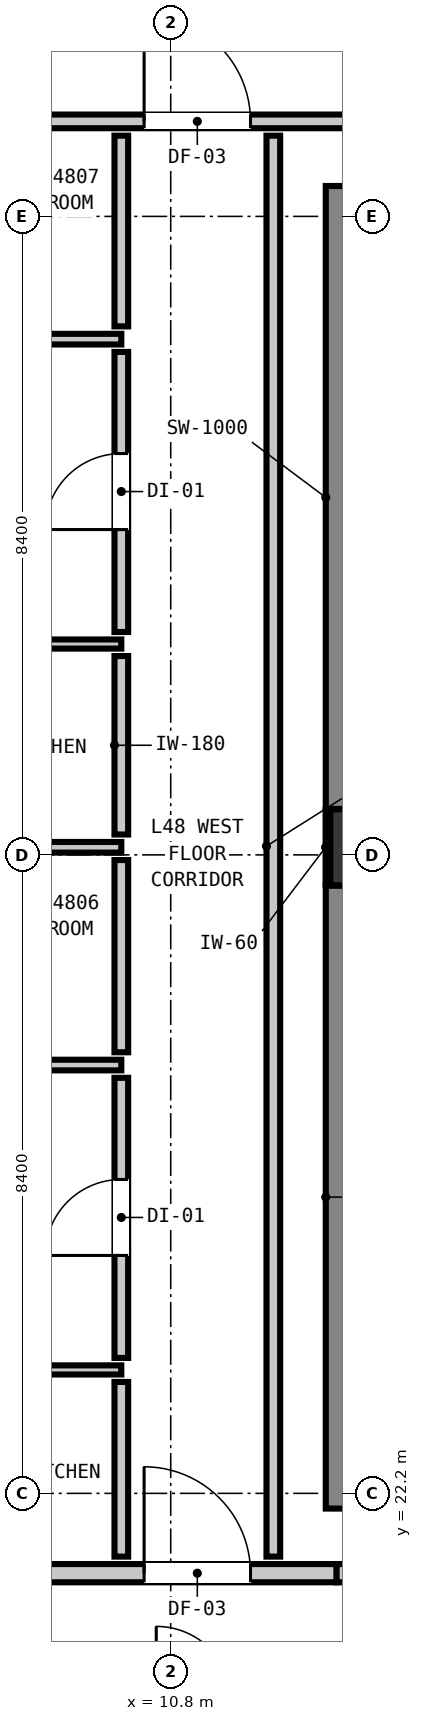
"""IFC4 building model, lengths in metres.
Left out: names, types, materials, properties, quantities, classifications, styles, units other than length and angle.
Written with IfcOpenShell. Run it as: python <this file> out.ifc"""

import sys

from ifc_helpers import new_model, si_unit, direction, frame, frame_2d, origin, origin_2d, place, context, subcontext, project, spatial, rectangle, extrude, element, fill, save


model = new_model("IFC4")
c1 = context("Model", 3, precision=1e-05, world=origin(), true_north=direction((0.0, 1.0)))
c2 = subcontext(c1, "Body", "Model", "MODEL_VIEW")
j1 = project(units=[si_unit("LENGTHUNIT", "METRE"), si_unit("PLANEANGLEUNIT", "RADIAN")], contexts=[c1])
p1 = place(None, origin())
s1 = spatial("IfcSite", under=j1, at=p1, CompositionType="ELEMENT")
p2 = place(p1, origin())
s2 = spatial("IfcBuilding", under=s1, at=p2, CompositionType="ELEMENT")
p3 = place(p2, frame((0.0, 0.0, 165.84)))
s3 = spatial("IfcBuildingStorey", under=s2, at=p3, CompositionType="ELEMENT", Elevation=165.84)
p4 = place(p3, frame((13.4, 30.7, 0.0), z_axis=(0.0, 0.0, 1.0), x_axis=(1.0, 0.0, 0.0)))
e1 = element("IfcColumn", 1, at=p4, inside=s3, PredefinedType="COLUMN", context=c2, shape_type="SweptSolid", body=[
    extrude(rectangle(XDim=1.0, YDim=1.0, at=origin_2d()), origin(), (0.0, 0.0, 1.0), 3.32),
])
p5 = place(p3, frame((13.34, 22.0, 0.0), z_axis=(0.0, 0.0, 1.0), x_axis=(0.0, 1.0, 0.0)))
e2 = element("IfcWall", 2, at=p5, inside=s3, PredefinedType="SHEAR", context=c2, shape_type="SweptSolid", body=[
    extrude(rectangle(XDim=8.195, YDim=1.0, at=frame_2d((4.098, 0.0))), origin(), (0.0, 0.0, 1.0), 3.32),
])
p6 = place(p3, frame((13.34, 31.205, 0.0), z_axis=(0.0, 0.0, 1.0), x_axis=(0.0, 1.0, 0.0)))
e3 = element("IfcWall", 3, at=p6, inside=s3, PredefinedType="SHEAR", context=c2, shape_type="SweptSolid", body=[
    extrude(rectangle(XDim=8.195, YDim=1.0, at=frame_2d((4.097, 0.0))), origin(), (0.0, 0.0, 1.0), 3.32),
])
p7 = place(p3, frame((4.067, 21.15, 0.0), z_axis=(0.0, 0.0, 1.0), x_axis=(1.0, 0.0, 0.0)))
e4 = element("IfcWall", 4, at=p7, inside=s3, PredefinedType="PARTITIONING", context=c2, shape_type="SweptSolid", body=[
    extrude(rectangle(XDim=8.916, YDim=0.24, at=frame_2d((4.458, 0.0))), origin(), (0.0, 0.0, 1.0), 2.565),
])
p8 = place(p7, frame((6.383, 0.0, 0.0)))
e5 = element("IfcOpeningElement", 5, at=p8, cuts=e4, PredefinedType="OPENING", context=c2, shape_type="SweptSolid", body=[
    extrude(rectangle(XDim=1.4, YDim=2.15, at=frame_2d((0.7, 1.075))), frame((0.0, 0.13, 0.0), z_axis=(0.0, -1.0, 0.0), x_axis=(1.0, 0.0, 0.0)), (0.0, 0.0, 1.0), 0.26),
])
p9 = place(p3, frame((12.983, 21.15, 0.0), z_axis=(0.0, 0.0, 1.0), x_axis=(1.0, 0.0, 0.0)))
e6 = element("IfcWall", 6, at=p9, inside=s3, PredefinedType="PARTITIONING", context=c2, shape_type="SweptSolid", body=[
    extrude(rectangle(XDim=29.61, YDim=0.24, at=frame_2d((14.805, 0.0))), origin(), (0.0, 0.0, 1.0), 3.08),
])
p10 = place(p9, frame((5.227, 0.0, 0.0)))
e7 = element("IfcOpeningElement", 7, at=p10, cuts=e6, PredefinedType="OPENING", context=c2, shape_type="SweptSolid", body=[
    extrude(rectangle(XDim=1.1, YDim=2.15, at=frame_2d((0.55, 1.075))), frame((0.0, 0.13, 0.0), z_axis=(0.0, -1.0, 0.0), x_axis=(1.0, 0.0, 0.0)), (0.0, 0.0, 1.0), 0.26),
])
p11 = place(p9, frame((25.067, 0.0, 0.0)))
e8 = element("IfcOpeningElement", 8, at=p11, cuts=e6, PredefinedType="OPENING", context=c2, shape_type="SweptSolid", body=[
    extrude(rectangle(XDim=1.4, YDim=2.15, at=frame_2d((0.7, 1.075))), frame((0.0, 0.13, 0.0), z_axis=(0.0, -1.0, 0.0), x_axis=(1.0, 0.0, 0.0)), (0.0, 0.0, 1.0), 0.26),
])
p12 = place(p3, frame((3.207, 40.25, 0.0), z_axis=(0.0, 0.0, 1.0), x_axis=(1.0, 0.0, 0.0)))
e9 = element("IfcWall", 9, at=p12, inside=s3, PredefinedType="PARTITIONING", context=c2, shape_type="SweptSolid", body=[
    extrude(rectangle(XDim=39.386, YDim=0.18, at=frame_2d((19.693, 0.0))), origin(), (0.0, 0.0, 1.0), 3.08),
])
p13 = place(p12, frame((14.228, 0.0, 0.0)))
e10 = element("IfcOpeningElement", 10, at=p13, cuts=e9, PredefinedType="OPENING", context=c2, shape_type="SweptSolid", body=[
    extrude(rectangle(XDim=1.4, YDim=2.15, at=frame_2d((0.7, 1.075))), frame((0.0, 0.1, 0.0), z_axis=(0.0, -1.0, 0.0), x_axis=(1.0, 0.0, 0.0)), (0.0, 0.0, 1.0), 0.2),
])
p14 = place(p12, frame((7.243, 0.0, 0.0)))
e11 = element("IfcOpeningElement", 11, at=p14, cuts=e9, PredefinedType="OPENING", context=c2, shape_type="SweptSolid", body=[
    extrude(rectangle(XDim=1.4, YDim=2.15, at=frame_2d((0.7, 1.075))), frame((0.0, 0.1, 0.0), z_axis=(0.0, -1.0, 0.0), x_axis=(1.0, 0.0, 0.0)), (0.0, 0.0, 1.0), 0.2),
])
p15 = place(p12, frame((34.843, 0.0, 0.0)))
e12 = element("IfcOpeningElement", 12, at=p15, cuts=e9, PredefinedType="OPENING", context=c2, shape_type="SweptSolid", body=[
    extrude(rectangle(XDim=1.4, YDim=2.15, at=frame_2d((0.7, 1.075))), frame((0.0, 0.1, 0.0), z_axis=(0.0, -1.0, 0.0), x_axis=(1.0, 0.0, 0.0)), (0.0, 0.0, 1.0), 0.2),
])
p16 = place(p3, frame((3.207, 27.835, 0.0), z_axis=(0.0, 0.0, 1.0), x_axis=(1.0, 0.0, 0.0)))
e13 = element("IfcWall", 13, at=p16, inside=s3, PredefinedType="PARTITIONING", context=c2, shape_type="SweptSolid", body=[
    extrude(rectangle(XDim=6.943, YDim=0.14, at=frame_2d((3.471, 0.0))), origin(), (0.0, 0.0, 1.0), 3.08),
])
p17 = place(p16, frame((5.006, 0.0, 0.0)))
e14 = element("IfcOpeningElement", 14, at=p17, cuts=e13, PredefinedType="OPENING", context=c2, shape_type="SweptSolid", body=[
    extrude(rectangle(XDim=0.86, YDim=2.02, at=frame_2d((0.43, 1.01))), frame((0.0, 0.08, 0.0), z_axis=(0.0, -1.0, 0.0), x_axis=(1.0, 0.0, 0.0)), (0.0, 0.0, 1.0), 0.16),
])
p18 = place(p16, frame((1.537, 0.0, 0.0)))
e15 = element("IfcOpeningElement", 15, at=p18, cuts=e13, PredefinedType="OPENING", context=c2, shape_type="SweptSolid", body=[
    extrude(rectangle(XDim=0.9, YDim=2.1, at=frame_2d((0.45, 1.05))), frame((0.0, 0.08, 0.0), z_axis=(0.0, -1.0, 0.0), x_axis=(1.0, 0.0, 0.0)), (0.0, 0.0, 1.0), 0.16),
])
p19 = place(p3, frame((4.232, 30.7, 0.0), z_axis=(0.0, 0.0, 1.0), x_axis=(1.0, 0.0, 0.0)))
e16 = element("IfcWall", 16, at=p19, inside=s3, PredefinedType="PARTITIONING", context=c2, shape_type="SweptSolid", body=[
    extrude(rectangle(XDim=5.918, YDim=0.14, at=frame_2d((2.959, 0.0))), origin(), (0.0, 0.0, 1.0), 2.315),
])
p20 = place(p3, frame((3.207, 37.385, 0.0), z_axis=(0.0, 0.0, 1.0), x_axis=(1.0, 0.0, 0.0)))
e17 = element("IfcWall", 17, at=p20, inside=s3, PredefinedType="PARTITIONING", context=c2, shape_type="SweptSolid", body=[
    extrude(rectangle(XDim=6.943, YDim=0.14, at=frame_2d((3.471, 0.0))), origin(), (0.0, 0.0, 1.0), 3.08),
])
p21 = place(p20, frame((5.006, 0.0, 0.0)))
e18 = element("IfcOpeningElement", 18, at=p21, cuts=e17, PredefinedType="OPENING", context=c2, shape_type="SweptSolid", body=[
    extrude(rectangle(XDim=0.86, YDim=2.02, at=frame_2d((0.43, 1.01))), frame((0.0, 0.08, 0.0), z_axis=(0.0, -1.0, 0.0), x_axis=(1.0, 0.0, 0.0)), (0.0, 0.0, 1.0), 0.16),
])
p22 = place(p20, frame((1.537, 0.0, 0.0)))
e19 = element("IfcOpeningElement", 19, at=p22, cuts=e17, PredefinedType="OPENING", context=c2, shape_type="SweptSolid", body=[
    extrude(rectangle(XDim=0.9, YDim=2.1, at=frame_2d((0.45, 1.05))), frame((0.0, 0.08, 0.0), z_axis=(0.0, -1.0, 0.0), x_axis=(1.0, 0.0, 0.0)), (0.0, 0.0, 1.0), 0.16),
])
p23 = place(p3, frame((3.207, 23.824, 0.0), z_axis=(0.0, 0.0, 1.0), x_axis=(1.0, 0.0, 0.0)))
e20 = element("IfcWall", 20, at=p23, inside=s3, PredefinedType="PARTITIONING", context=c2, shape_type="SweptSolid", body=[
    extrude(rectangle(XDim=6.943, YDim=0.12, at=frame_2d((3.471, 0.0))), origin(), (0.0, 0.0, 1.0), 3.08),
])
p24 = place(p23, frame((3.018, 0.0, 0.0)))
e21 = element("IfcOpeningElement", 21, at=p24, cuts=e20, PredefinedType="OPENING", context=c2, shape_type="SweptSolid", body=[
    extrude(rectangle(XDim=0.9, YDim=2.1, at=frame_2d((0.45, 1.05))), frame((0.0, 0.07, 0.0), z_axis=(0.0, -1.0, 0.0), x_axis=(1.0, 0.0, 0.0)), (0.0, 0.0, 1.0), 0.14),
])
p25 = place(p3, frame((3.207, 33.374, 0.0), z_axis=(0.0, 0.0, 1.0), x_axis=(1.0, 0.0, 0.0)))
e22 = element("IfcWall", 22, at=p25, inside=s3, PredefinedType="PARTITIONING", context=c2, shape_type="SweptSolid", body=[
    extrude(rectangle(XDim=6.943, YDim=0.12, at=frame_2d((3.471, 0.0))), origin(), (0.0, 0.0, 1.0), 3.08),
])
p26 = place(p25, frame((3.018, 0.0, 0.0)))
e23 = element("IfcOpeningElement", 23, at=p26, cuts=e22, PredefinedType="OPENING", context=c2, shape_type="SweptSolid", body=[
    extrude(rectangle(XDim=0.9, YDim=2.1, at=frame_2d((0.45, 1.05))), frame((0.0, 0.07, 0.0), z_axis=(0.0, -1.0, 0.0), x_axis=(1.0, 0.0, 0.0)), (0.0, 0.0, 1.0), 0.14),
])
p27 = place(p3, frame((10.15, 21.368, 0.0), z_axis=(0.0, 0.0, 1.0), x_axis=(0.0, 1.0, 0.0)))
e24 = element("IfcWall", 24, at=p27, inside=s3, PredefinedType="PARTITIONING", context=c2, shape_type="SweptSolid", body=[
    extrude(rectangle(XDim=2.298, YDim=0.18, at=frame_2d((1.149, 0.0))), origin(), (0.0, 0.0, 1.0), 3.08),
])
p28 = place(p3, frame((10.15, 23.982, 0.0), z_axis=(0.0, 0.0, 1.0), x_axis=(0.0, 1.0, 0.0)))
e25 = element("IfcWall", 25, at=p28, inside=s3, PredefinedType="PARTITIONING", context=c2, shape_type="SweptSolid", body=[
    extrude(rectangle(XDim=3.685, YDim=0.18, at=frame_2d((1.843, 0.0))), origin(), (0.0, 0.0, 1.0), 3.08),
])
p29 = place(p28, frame((1.348, 0.0, 0.0)))
e26 = element("IfcOpeningElement", 26, at=p29, cuts=e25, PredefinedType="OPENING", context=c2, shape_type="SweptSolid", body=[
    extrude(rectangle(XDim=1.0, YDim=2.15, at=frame_2d((0.5, 1.075))), frame((0.0, 0.1, 0.0), z_axis=(0.0, -1.0, 0.0), x_axis=(1.0, 0.0, 0.0)), (0.0, 0.0, 1.0), 0.2),
])
p30 = place(p3, frame((10.15, 28.003, 0.0), z_axis=(0.0, 0.0, 1.0), x_axis=(0.0, 1.0, 0.0)))
e27 = element("IfcWall", 27, at=p30, inside=s3, PredefinedType="PARTITIONING", context=c2, shape_type="SweptSolid", body=[
    extrude(rectangle(XDim=2.529, YDim=0.18, at=frame_2d((1.265, 0.0))), origin(), (0.0, 0.0, 1.0), 3.08),
])
p31 = place(p3, frame((10.15, 30.868, 0.0), z_axis=(0.0, 0.0, 1.0), x_axis=(0.0, 1.0, 0.0)))
e28 = element("IfcWall", 28, at=p31, inside=s3, PredefinedType="PARTITIONING", context=c2, shape_type="SweptSolid", body=[
    extrude(rectangle(XDim=2.348, YDim=0.18, at=frame_2d((1.174, 0.0))), origin(), (0.0, 0.0, 1.0), 3.08),
])
p32 = place(p3, frame((10.15, 33.532, 0.0), z_axis=(0.0, 0.0, 1.0), x_axis=(0.0, 1.0, 0.0)))
e29 = element("IfcWall", 29, at=p32, inside=s3, PredefinedType="PARTITIONING", context=c2, shape_type="SweptSolid", body=[
    extrude(rectangle(XDim=3.685, YDim=0.18, at=frame_2d((1.843, 0.0))), origin(), (0.0, 0.0, 1.0), 3.08),
])
p33 = place(p32, frame((1.348, 0.0, 0.0)))
e30 = element("IfcOpeningElement", 30, at=p33, cuts=e29, PredefinedType="OPENING", context=c2, shape_type="SweptSolid", body=[
    extrude(rectangle(XDim=1.0, YDim=2.15, at=frame_2d((0.5, 1.075))), frame((0.0, 0.1, 0.0), z_axis=(0.0, -1.0, 0.0), x_axis=(1.0, 0.0, 0.0)), (0.0, 0.0, 1.0), 0.2),
])
p34 = place(p3, frame((10.15, 37.553, 0.0), z_axis=(0.0, 0.0, 1.0), x_axis=(0.0, 1.0, 0.0)))
e31 = element("IfcWall", 31, at=p34, inside=s3, PredefinedType="PARTITIONING", context=c2, shape_type="SweptSolid", body=[
    extrude(rectangle(XDim=2.509, YDim=0.18, at=frame_2d((1.254, 0.0))), origin(), (0.0, 0.0, 1.0), 3.08),
])
p35 = place(p3, frame((12.15, 21.368, 0.0), z_axis=(0.0, 0.0, 1.0), x_axis=(0.0, 1.0, 0.0)))
e32 = element("IfcWall", 32, at=p35, inside=s3, PredefinedType="PARTITIONING", context=c2, shape_type="SweptSolid", body=[
    extrude(rectangle(XDim=18.694, YDim=0.18, at=frame_2d((9.347, 0.0))), origin(), (0.0, 0.0, 1.0), 3.08),
])
p36 = place(p3, frame((12.868, 30.21, 0.0), z_axis=(0.0, 0.0, 1.0), x_axis=(0.0, 1.0, 0.0)))
e33 = element("IfcWall", 33, at=p36, inside=s3, PredefinedType="PARTITIONING", context=c2, shape_type="SweptSolid", body=[
    extrude(rectangle(XDim=0.98, YDim=0.06, at=frame_2d((0.49, 0.0))), origin(), (0.0, 0.0, 1.0), 1.45),
])
p37 = place(p8, origin())
e34 = element("IfcDoor", 34, at=p37, inside=s3, OperationType="SINGLE_SWING_LEFT", PredefinedType="DOOR", context=c2, shape_type="SweptSolid", body=[
    extrude(rectangle(XDim=1.4, YDim=2.15, at=frame_2d((0.7, 1.075))), frame((0.0, 0.025, 0.0), z_axis=(0.0, -1.0, 0.0), x_axis=(1.0, 0.0, 0.0)), (0.0, 0.0, 1.0), 0.05),
])
fill(e5, e34)
p38 = place(p14, origin())
e35 = element("IfcDoor", 35, at=p38, inside=s3, OperationType="SINGLE_SWING_LEFT", PredefinedType="DOOR", context=c2, shape_type="SweptSolid", body=[
    extrude(rectangle(XDim=1.4, YDim=2.15, at=frame_2d((0.7, 1.075))), frame((0.0, 0.025, 0.0), z_axis=(0.0, -1.0, 0.0), x_axis=(1.0, 0.0, 0.0)), (0.0, 0.0, 1.0), 0.05),
])
fill(e11, e35)
p39 = place(p29, origin())
e36 = element("IfcDoor", 36, at=p39, inside=s3, OperationType="SINGLE_SWING_LEFT", PredefinedType="DOOR", context=c2, shape_type="SweptSolid", body=[
    extrude(rectangle(XDim=1.0, YDim=2.15, at=frame_2d((0.5, 1.075))), frame((0.0, 0.025, 0.0), z_axis=(0.0, -1.0, 0.0), x_axis=(1.0, 0.0, 0.0)), (0.0, 0.0, 1.0), 0.05),
])
fill(e26, e36)
p40 = place(p33, origin())
e37 = element("IfcDoor", 37, at=p40, inside=s3, OperationType="SINGLE_SWING_LEFT", PredefinedType="DOOR", context=c2, shape_type="SweptSolid", body=[
    extrude(rectangle(XDim=1.0, YDim=2.15, at=frame_2d((0.5, 1.075))), frame((0.0, 0.025, 0.0), z_axis=(0.0, -1.0, 0.0), x_axis=(1.0, 0.0, 0.0)), (0.0, 0.0, 1.0), 0.05),
])
fill(e30, e37)
save(model, sys.argv[1])
